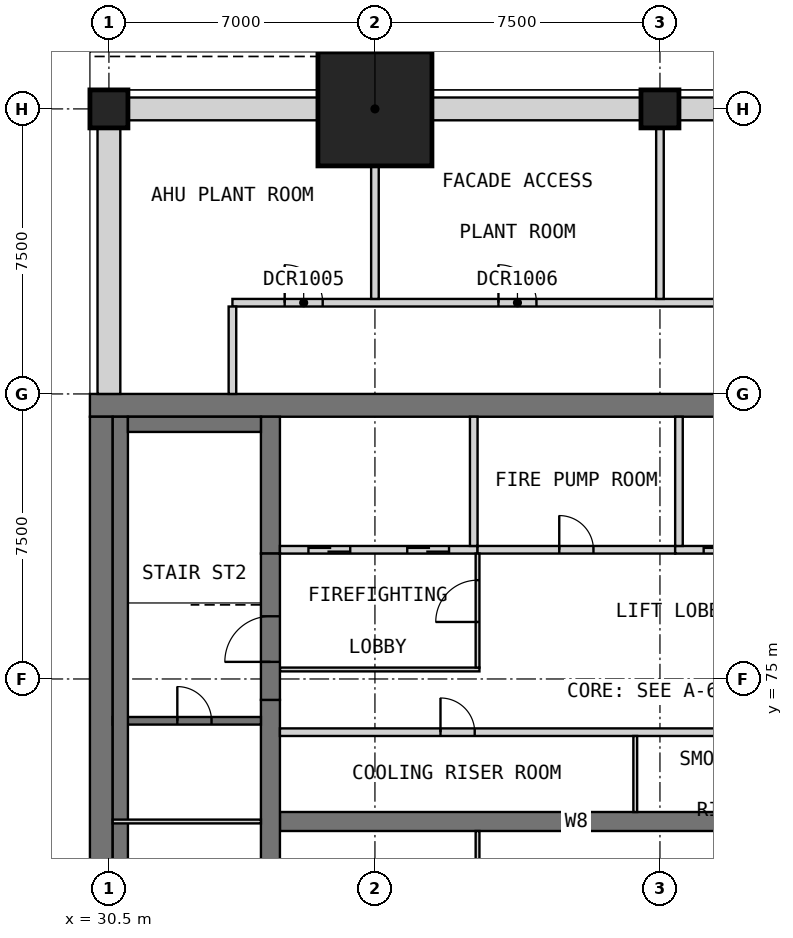
"""IFC4 building model, lengths in metres.
Left out: names, types, materials, properties, quantities, classifications, styles, units other than length and angle.
Written with IfcOpenShell. Run it as: python <this file> out.ifc"""

import sys

from ifc_helpers import new_model, si_unit, direction, frame, frame_2d, origin, origin_2d, place, context, subcontext, project, spatial, rectangle, extrude, element, fill, save


model = new_model("IFC4")
c1 = context("Model", 3, precision=1e-05, world=origin(), true_north=direction((0.0, 1.0)))
c2 = subcontext(c1, "Body", "Model", "MODEL_VIEW")
j1 = project(units=[si_unit("LENGTHUNIT", "METRE"), si_unit("PLANEANGLEUNIT", "RADIAN")], contexts=[c1])
p1 = place(None, origin())
s1 = spatial("IfcSite", under=j1, at=p1, CompositionType="ELEMENT")
p2 = place(p1, origin())
s2 = spatial("IfcBuilding", under=s1, at=p2, CompositionType="ELEMENT")
p3 = place(p2, frame((0.0, 0.0, 320.2)))
s3 = spatial("IfcBuildingStorey", under=s2, at=p3, CompositionType="ELEMENT", Elevation=320.2)
for number, where, z_axis, x_axis in (
    (1, (30.5, 90.0, 0.0), (0.0, 0.0, 1.0), (1.0, 0.0, 0.0)),
    (2, (45.0, 90.0, 0.0), (0.0, 0.0, 1.0), (1.0, 0.0, 0.0)),
):
    element("IfcColumn", number, at=place(p3, frame(where, z_axis=z_axis, x_axis=x_axis)), inside=s3, PredefinedType="COLUMN", context=c2, shape_type="SweptSolid", body=[
        extrude(rectangle(XDim=1.0, YDim=1.0, at=origin_2d()), origin(), (0.0, 0.0, 1.0), 8.0),
    ])
p4 = place(p3, frame((37.5, 90.0, 0.0), z_axis=(0.0, 0.0, 1.0), x_axis=(1.0, 0.0, 0.0)))
e3 = element("IfcColumn", 3, at=p4, inside=s3, PredefinedType="COLUMN", context=c2, shape_type="SweptSolid", body=[
    extrude(rectangle(XDim=3.0, YDim=3.0, at=origin_2d()), origin(), (0.0, 0.0, 1.0), 8.0),
])
p5 = place(p3, frame((30.0, 82.2, 0.0), z_axis=(0.0, 0.0, 1.0), x_axis=(1.0, 0.0, 0.0)))
e4 = element("IfcWall", 4, at=p5, inside=s3, PredefinedType="SHEAR", context=c2, shape_type="SweptSolid", body=[
    extrude(rectangle(XDim=30.0, YDim=0.6, at=frame_2d((15.0, 0.0))), origin(), (0.0, 0.0, 1.0), 7.7),
])
p6 = place(p3, frame((30.3, 60.6, 0.0), z_axis=(0.0, 0.0, 1.0), x_axis=(0.0, 1.0, 0.0)))
e5 = element("IfcWall", 5, at=p6, inside=s3, PredefinedType="SHEAR", context=c2, shape_type="SweptSolid", body=[
    extrude(rectangle(XDim=21.3, YDim=0.6, at=frame_2d((10.65, 0.0))), origin(), (0.0, 0.0, 1.0), 7.7),
])
p7 = place(p3, frame((35.0, 71.25, 0.0), z_axis=(0.0, 0.0, 1.0), x_axis=(1.0, 0.0, 0.0)))
e6 = element("IfcWall", 6, at=p7, inside=s3, PredefinedType="SHEAR", context=c2, shape_type="SweptSolid", body=[
    extrude(rectangle(XDim=15.6, YDim=0.5, at=frame_2d((7.8, 0.0))), origin(), (0.0, 0.0, 1.0), 7.7),
])
p8 = place(p3, frame((34.75, 68.05, 0.0), z_axis=(0.0, 0.0, 1.0), x_axis=(0.0, 1.0, 0.0)))
e7 = element("IfcWall", 7, at=p8, inside=s3, PredefinedType="SHEAR", context=c2, shape_type="SweptSolid", body=[
    extrude(rectangle(XDim=6.4, YDim=0.5, at=frame_2d((3.2, 0.0))), origin(), (0.0, 0.0, 1.0), 7.7),
])
p9 = place(p3, frame((34.75, 78.3, 0.0), z_axis=(0.0, 0.0, 1.0), x_axis=(0.0, 1.0, 0.0)))
e8 = element("IfcWall", 8, at=p9, inside=s3, PredefinedType="SHEAR", context=c2, shape_type="SweptSolid", body=[
    extrude(rectangle(XDim=3.6, YDim=0.5, at=frame_2d((1.8, 0.0))), origin(), (0.0, 0.0, 1.0), 7.7),
])
p10 = place(p3, frame((52.0, 90.0, 0.0), z_axis=(0.0, 0.0, 1.0), x_axis=(-1.0, 0.0, 0.0)))
e9 = element("IfcWall", 9, at=p10, inside=s3, PredefinedType="ELEMENTEDWALL", context=c2, shape_type="SweptSolid", body=[
    extrude(rectangle(XDim=6.5, YDim=0.6, at=frame_2d((3.25, 0.0))), origin(), (0.0, 0.0, 1.0), 6.8),
])
p11 = place(p10, frame((2.75, 0.0, 0.0)))
e10 = element("IfcOpeningElement", 10, at=p11, cuts=e9, PredefinedType="OPENING", context=c2, shape_type="SweptSolid", body=[
    extrude(rectangle(XDim=1.0, YDim=2.1, at=frame_2d((0.5, 1.05))), frame((0.0, 0.31, 0.0), z_axis=(0.0, -1.0, 0.0), x_axis=(1.0, 0.0, 0.0)), (0.0, 0.0, 1.0), 0.62),
])
p12 = place(p3, frame((44.5, 90.0, 0.0), z_axis=(0.0, 0.0, 1.0), x_axis=(-1.0, 0.0, 0.0)))
e11 = element("IfcWall", 11, at=p12, inside=s3, PredefinedType="ELEMENTEDWALL", context=c2, shape_type="SweptSolid", body=[
    extrude(rectangle(XDim=5.5, YDim=0.6, at=frame_2d((2.75, 0.0))), origin(), (0.0, 0.0, 1.0), 6.8),
])
p13 = place(p3, frame((36.0, 90.0, 0.0), z_axis=(0.0, 0.0, 1.0), x_axis=(-1.0, 0.0, 0.0)))
e12 = element("IfcWall", 12, at=p13, inside=s3, PredefinedType="ELEMENTEDWALL", context=c2, shape_type="SweptSolid", body=[
    extrude(rectangle(XDim=5.0, YDim=0.6, at=frame_2d((2.5, 0.0))), origin(), (0.0, 0.0, 1.0), 6.8),
])
p14 = place(p3, frame((30.5, 89.5, 0.0), z_axis=(0.0, 0.0, 1.0), x_axis=(0.0, -1.0, 0.0)))
e13 = element("IfcWall", 13, at=p14, inside=s3, PredefinedType="ELEMENTEDWALL", context=c2, shape_type="SweptSolid", body=[
    extrude(rectangle(XDim=7.0, YDim=0.6, at=frame_2d((3.5, 0.0))), origin(), (0.0, 0.0, 1.0), 6.8),
])
p15 = place(p3, frame((40.2, 68.25, 0.0), z_axis=(0.0, 0.0, 1.0), x_axis=(0.0, 1.0, 0.0)))
e14 = element("IfcWall", 14, at=p15, inside=s3, PredefinedType="PARTITIONING", context=c2, shape_type="SweptSolid", body=[
    extrude(rectangle(XDim=2.75, YDim=0.1, at=frame_2d((1.375, 0.0))), origin(), (0.0, 0.0, 1.0), 7.7),
])
p16 = place(p3, frame((35.0, 73.6, 0.0), z_axis=(0.0, 0.0, 1.0), x_axis=(1.0, 0.0, 0.0)))
e15 = element("IfcWall", 15, at=p16, inside=s3, PredefinedType="PARTITIONING", context=c2, shape_type="SweptSolid", body=[
    extrude(rectangle(XDim=15.6, YDim=0.2, at=frame_2d((7.8, 0.0))), origin(), (0.0, 0.0, 1.0), 7.7),
])
p17 = place(p16, frame((4.225, 0.0, 0.0)))
e16 = element("IfcOpeningElement", 16, at=p17, cuts=e15, PredefinedType="OPENING", context=c2, shape_type="SweptSolid", body=[
    extrude(rectangle(XDim=0.9, YDim=2.1, at=frame_2d((0.45, 1.05))), frame((0.0, 0.11, 0.0), z_axis=(0.0, -1.0, 0.0), x_axis=(1.0, 0.0, 0.0)), (0.0, 0.0, 1.0), 0.22),
])
p18 = place(p16, frame((12.025, 0.0, 0.0)))
e17 = element("IfcOpeningElement", 17, at=p18, cuts=e15, PredefinedType="OPENING", context=c2, shape_type="SweptSolid", body=[
    extrude(rectangle(XDim=0.9, YDim=2.1, at=frame_2d((0.45, 1.05))), frame((0.0, 0.11, 0.0), z_axis=(0.0, -1.0, 0.0), x_axis=(1.0, 0.0, 0.0)), (0.0, 0.0, 1.0), 0.22),
])
p19 = place(p3, frame((44.35, 71.5, 0.0), z_axis=(0.0, 0.0, 1.0), x_axis=(0.0, 1.0, 0.0)))
e18 = element("IfcWall", 18, at=p19, inside=s3, PredefinedType="PARTITIONING", context=c2, shape_type="SweptSolid", body=[
    extrude(rectangle(XDim=2.0, YDim=0.1, at=frame_2d((1.0, 0.0))), origin(), (0.0, 0.0, 1.0), 7.7),
])
p20 = place(p3, frame((35.0, 78.4, 0.0), z_axis=(0.0, 0.0, 1.0), x_axis=(1.0, 0.0, 0.0)))
e19 = element("IfcWall", 19, at=p20, inside=s3, PredefinedType="SOLIDWALL", context=c2, shape_type="SweptSolid", body=[
    extrude(rectangle(XDim=5.2, YDim=0.2, at=frame_2d((2.6, 0.0))), origin(), (0.0, 0.0, 1.0), 8.0),
])
p21 = place(p20, frame((0.75, 0.0, 0.0)))
e20 = element("IfcOpeningElement", 20, at=p21, cuts=e19, PredefinedType="OPENING", context=c2, shape_type="SweptSolid", body=[
    extrude(rectangle(XDim=1.1, YDim=2.1, at=frame_2d((0.55, 1.05))), frame((0.0, 0.11, 0.0), z_axis=(0.0, -1.0, 0.0), x_axis=(1.0, 0.0, 0.0)), (0.0, 0.0, 1.0), 0.22),
])
p22 = place(p20, frame((3.35, 0.0, 0.0)))
e21 = element("IfcOpeningElement", 21, at=p22, cuts=e19, PredefinedType="OPENING", context=c2, shape_type="SweptSolid", body=[
    extrude(rectangle(XDim=1.1, YDim=2.1, at=frame_2d((0.55, 1.05))), frame((0.0, 0.11, 0.0), z_axis=(0.0, -1.0, 0.0), x_axis=(1.0, 0.0, 0.0)), (0.0, 0.0, 1.0), 0.22),
])
p23 = place(p3, frame((40.1, 78.5, 0.0), z_axis=(0.0, 0.0, 1.0), x_axis=(0.0, 1.0, 0.0)))
e22 = element("IfcWall", 22, at=p23, inside=s3, PredefinedType="SOLIDWALL", context=c2, shape_type="SweptSolid", body=[
    extrude(rectangle(XDim=3.4, YDim=0.2, at=frame_2d((1.7, 0.0))), origin(), (0.0, 0.0, 1.0), 8.0),
])
p24 = place(p3, frame((40.2, 78.4, 0.0), z_axis=(0.0, 0.0, 1.0), x_axis=(1.0, 0.0, 0.0)))
e23 = element("IfcWall", 23, at=p24, inside=s3, PredefinedType="PARTITIONING", context=c2, shape_type="SweptSolid", body=[
    extrude(rectangle(XDim=5.2, YDim=0.2, at=frame_2d((2.6, 0.0))), origin(), (0.0, 0.0, 1.0), 7.7),
])
p25 = place(p24, frame((2.15, 0.0, 0.0)))
e24 = element("IfcOpeningElement", 24, at=p25, cuts=e23, PredefinedType="OPENING", context=c2, shape_type="SweptSolid", body=[
    extrude(rectangle(XDim=0.9, YDim=2.1, at=frame_2d((0.45, 1.05))), frame((0.0, 0.11, 0.0), z_axis=(0.0, -1.0, 0.0), x_axis=(1.0, 0.0, 0.0)), (0.0, 0.0, 1.0), 0.22),
])
p26 = place(p3, frame((45.4, 78.4, 0.0), z_axis=(0.0, 0.0, 1.0), x_axis=(1.0, 0.0, 0.0)))
e25 = element("IfcWall", 25, at=p26, inside=s3, PredefinedType="SOLIDWALL", context=c2, shape_type="SweptSolid", body=[
    extrude(rectangle(XDim=5.2, YDim=0.2, at=frame_2d((2.6, 0.0))), origin(), (0.0, 0.0, 1.0), 8.0),
])
p27 = place(p26, frame((0.75, 0.0, 0.0)))
e26 = element("IfcOpeningElement", 26, at=p27, cuts=e25, PredefinedType="OPENING", context=c2, shape_type="SweptSolid", body=[
    extrude(rectangle(XDim=1.1, YDim=2.1, at=frame_2d((0.55, 1.05))), frame((0.0, 0.11, 0.0), z_axis=(0.0, -1.0, 0.0), x_axis=(1.0, 0.0, 0.0)), (0.0, 0.0, 1.0), 0.22),
])
p28 = place(p26, frame((3.35, 0.0, 0.0)))
e27 = element("IfcOpeningElement", 27, at=p28, cuts=e25, PredefinedType="OPENING", context=c2, shape_type="SweptSolid", body=[
    extrude(rectangle(XDim=1.1, YDim=2.1, at=frame_2d((0.55, 1.05))), frame((0.0, 0.11, 0.0), z_axis=(0.0, -1.0, 0.0), x_axis=(1.0, 0.0, 0.0)), (0.0, 0.0, 1.0), 0.22),
])
p29 = place(p3, frame((45.5, 78.5, 0.0), z_axis=(0.0, 0.0, 1.0), x_axis=(0.0, 1.0, 0.0)))
e28 = element("IfcWall", 28, at=p29, inside=s3, PredefinedType="SOLIDWALL", context=c2, shape_type="SweptSolid", body=[
    extrude(rectangle(XDim=3.4, YDim=0.2, at=frame_2d((1.7, 0.0))), origin(), (0.0, 0.0, 1.0), 8.0),
])
p30 = place(p3, frame((35.0, 75.25, 0.0), z_axis=(0.0, 0.0, 1.0), x_axis=(1.0, 0.0, 0.0)))
e29 = element("IfcWall", 29, at=p30, inside=s3, PredefinedType="PARTITIONING", context=c2, shape_type="SweptSolid", body=[
    extrude(rectangle(XDim=5.25, YDim=0.1, at=frame_2d((2.625, 0.0))), origin(), (0.0, 0.0, 1.0), 7.7),
])
p31 = place(p3, frame((40.2, 75.3, 0.0), z_axis=(0.0, 0.0, 1.0), x_axis=(0.0, 1.0, 0.0)))
e30 = element("IfcWall", 30, at=p31, inside=s3, PredefinedType="PARTITIONING", context=c2, shape_type="SweptSolid", body=[
    extrude(rectangle(XDim=3.0, YDim=0.1, at=frame_2d((1.5, 0.0))), origin(), (0.0, 0.0, 1.0), 7.7),
])
p32 = place(p31, frame((1.2, 0.0, 0.0)))
e31 = element("IfcOpeningElement", 31, at=p32, cuts=e30, PredefinedType="OPENING", context=c2, shape_type="SweptSolid", body=[
    extrude(rectangle(XDim=1.1, YDim=2.1, at=frame_2d((0.55, 1.05))), frame((0.0, 0.06, 0.0), z_axis=(0.0, -1.0, 0.0), x_axis=(1.0, 0.0, 0.0)), (0.0, 0.0, 1.0), 0.12),
])
p33 = place(p3, frame((34.75, 74.45, 0.0), z_axis=(0.0, 0.0, 1.0), x_axis=(0.0, 1.0, 0.0)))
e32 = element("IfcWall", 32, at=p33, inside=s3, PredefinedType="SOLIDWALL", context=c2, shape_type="SweptSolid", body=[
    extrude(rectangle(XDim=3.85, YDim=0.5, at=frame_2d((1.925, 0.0))), origin(), (0.0, 0.0, 1.0), 6.5),
])
p34 = place(p33, frame((1.0, 0.0, 0.0)))
e33 = element("IfcOpeningElement", 33, at=p34, cuts=e32, PredefinedType="OPENING", context=c2, shape_type="SweptSolid", body=[
    extrude(rectangle(XDim=1.2, YDim=2.1, at=frame_2d((0.6, 1.05))), frame((0.0, 0.26, 0.0), z_axis=(0.0, -1.0, 0.0), x_axis=(1.0, 0.0, 0.0)), (0.0, 0.0, 1.0), 0.52),
])
p35 = place(p3, frame((30.6, 73.9, 0.0), z_axis=(0.0, 0.0, 1.0), x_axis=(1.0, 0.0, 0.0)))
e34 = element("IfcWall", 34, at=p35, inside=s3, PredefinedType="SOLIDWALL", context=c2, shape_type="SweptSolid", body=[
    extrude(rectangle(XDim=3.9, YDim=0.2, at=frame_2d((1.95, 0.0))), origin(), (0.0, 0.0, 1.0), 7.7),
])
p36 = place(p35, frame((1.7, 0.0, 0.0)))
e35 = element("IfcOpeningElement", 35, at=p36, cuts=e34, PredefinedType="OPENING", context=c2, shape_type="SweptSolid", body=[
    extrude(rectangle(XDim=0.9, YDim=2.1, at=frame_2d((0.45, 1.05))), frame((0.0, 0.11, 0.0), z_axis=(0.0, -1.0, 0.0), x_axis=(1.0, 0.0, 0.0)), (0.0, 0.0, 1.0), 0.22),
])
p37 = place(p3, frame((30.8, 60.6, 0.0), z_axis=(0.0, 0.0, 1.0), x_axis=(0.0, 1.0, 0.0)))
e36 = element("IfcWall", 36, at=p37, inside=s3, PredefinedType="SOLIDWALL", context=c2, shape_type="SweptSolid", body=[
    extrude(rectangle(XDim=21.3, YDim=0.4, at=frame_2d((10.65, 0.0))), origin(), (0.0, 0.0, 1.0), 7.7),
])
p38 = place(p3, frame((31.0, 81.7, 0.0), z_axis=(0.0, 0.0, 1.0), x_axis=(1.0, 0.0, 0.0)))
e37 = element("IfcWall", 37, at=p38, inside=s3, PredefinedType="SOLIDWALL", context=c2, shape_type="SweptSolid", body=[
    extrude(rectangle(XDim=3.5, YDim=0.4, at=frame_2d((1.75, 0.0))), origin(), (0.0, 0.0, 1.0), 7.7),
])
p39 = place(p3, frame((30.6, 71.25, 0.0), z_axis=(0.0, 0.0, 1.0), x_axis=(1.0, 0.0, 0.0)))
e38 = element("IfcWall", 38, at=p39, inside=s3, PredefinedType="PARTITIONING", context=c2, shape_type="SweptSolid", body=[
    extrude(rectangle(XDim=3.9, YDim=0.1, at=frame_2d((1.95, 0.0))), origin(), (0.0, 0.0, 1.0), 7.7),
])
p40 = place(p3, frame((33.75, 84.9, 0.0), z_axis=(0.0, 0.0, 1.0), x_axis=(1.0, 0.0, 0.0)))
e39 = element("IfcWall", 39, at=p40, inside=s3, PredefinedType="PARTITIONING", context=c2, shape_type="SweptSolid", body=[
    extrude(rectangle(XDim=28.65, YDim=0.2, at=frame_2d((14.325, 0.0))), origin(), (0.0, 0.0, 1.0), 7.7),
])
p41 = place(p40, frame((1.375, 0.0, 0.0)))
e40 = element("IfcOpeningElement", 40, at=p41, cuts=e39, PredefinedType="OPENING", context=c2, shape_type="SweptSolid", body=[
    extrude(rectangle(XDim=1.0, YDim=2.1, at=frame_2d((0.5, 1.05))), frame((0.0, 0.11, 0.0), z_axis=(0.0, -1.0, 0.0), x_axis=(1.0, 0.0, 0.0)), (0.0, 0.0, 1.0), 0.22),
])
p42 = place(p40, frame((7.0, 0.0, 0.0)))
e41 = element("IfcOpeningElement", 41, at=p42, cuts=e39, PredefinedType="OPENING", context=c2, shape_type="SweptSolid", body=[
    extrude(rectangle(XDim=1.0, YDim=2.1, at=frame_2d((0.5, 1.05))), frame((0.0, 0.11, 0.0), z_axis=(0.0, -1.0, 0.0), x_axis=(1.0, 0.0, 0.0)), (0.0, 0.0, 1.0), 0.22),
])
p43 = place(p40, frame((18.25, 0.0, 0.0)))
e42 = element("IfcOpeningElement", 42, at=p43, cuts=e39, PredefinedType="OPENING", context=c2, shape_type="SweptSolid", body=[
    extrude(rectangle(XDim=1.0, YDim=2.1, at=frame_2d((0.5, 1.05))), frame((0.0, 0.11, 0.0), z_axis=(0.0, -1.0, 0.0), x_axis=(1.0, 0.0, 0.0)), (0.0, 0.0, 1.0), 0.22),
])
p44 = place(p3, frame((33.75, 82.5, 0.0), z_axis=(0.0, 0.0, 1.0), x_axis=(0.0, 1.0, 0.0)))
e43 = element("IfcWall", 43, at=p44, inside=s3, PredefinedType="PARTITIONING", context=c2, shape_type="SweptSolid", body=[
    extrude(rectangle(XDim=2.3, YDim=0.2, at=frame_2d((1.15, 0.0))), origin(), (0.0, 0.0, 1.0), 7.7),
])
for number, where, z_axis, x_axis in (
    (44, (37.5, 85.0, 0.0), (0.0, 0.0, 1.0), (0.0, 1.0, 0.0)),
    (45, (45.0, 85.0, 0.0), (0.0, 0.0, 1.0), (0.0, 1.0, 0.0)),
):
    element("IfcWall", number, at=place(p3, frame(where, z_axis=z_axis, x_axis=x_axis)), inside=s3, PredefinedType="PARTITIONING", context=c2, shape_type="SweptSolid", body=[
        extrude(rectangle(XDim=5.5, YDim=0.2, at=frame_2d((2.75, 0.0))), origin(), (0.0, 0.0, 1.0), 7.7),
    ])
p45 = place(p17, origin())
e46 = element("IfcDoor", 46, at=p45, inside=s3, OperationType="SINGLE_SWING_RIGHT", PredefinedType="DOOR", context=c2, shape_type="SweptSolid", body=[
    extrude(rectangle(XDim=0.9, YDim=2.1, at=frame_2d((0.45, 1.05))), frame((0.0, 0.025, 0.0), z_axis=(0.0, -1.0, 0.0), x_axis=(1.0, 0.0, 0.0)), (0.0, 0.0, 1.0), 0.05),
])
fill(e16, e46)
p46 = place(p21, origin())
e47 = element("IfcDoor", 47, at=p46, inside=s3, OperationType="DOUBLE_DOOR_SLIDING", PredefinedType="DOOR", context=c2, shape_type="SweptSolid", body=[
    extrude(rectangle(XDim=1.1, YDim=2.1, at=frame_2d((0.55, 1.05))), frame((0.0, 0.025, 0.0), z_axis=(0.0, -1.0, 0.0), x_axis=(1.0, 0.0, 0.0)), (0.0, 0.0, 1.0), 0.05),
])
fill(e20, e47)
p47 = place(p22, origin())
e48 = element("IfcDoor", 48, at=p47, inside=s3, OperationType="DOUBLE_DOOR_SLIDING", PredefinedType="DOOR", context=c2, shape_type="SweptSolid", body=[
    extrude(rectangle(XDim=1.1, YDim=2.1, at=frame_2d((0.55, 1.05))), frame((0.0, 0.025, 0.0), z_axis=(0.0, -1.0, 0.0), x_axis=(1.0, 0.0, 0.0)), (0.0, 0.0, 1.0), 0.05),
])
fill(e21, e48)
p48 = place(p25, origin())
e49 = element("IfcDoor", 49, at=p48, inside=s3, OperationType="SINGLE_SWING_RIGHT", PredefinedType="DOOR", context=c2, shape_type="SweptSolid", body=[
    extrude(rectangle(XDim=0.9, YDim=2.1, at=frame_2d((0.45, 1.05))), frame((0.0, 0.025, 0.0), z_axis=(0.0, -1.0, 0.0), x_axis=(1.0, 0.0, 0.0)), (0.0, 0.0, 1.0), 0.05),
])
fill(e24, e49)
p49 = place(p27, origin())
e50 = element("IfcDoor", 50, at=p49, inside=s3, OperationType="DOUBLE_DOOR_SLIDING", PredefinedType="DOOR", context=c2, shape_type="SweptSolid", body=[
    extrude(rectangle(XDim=1.1, YDim=2.1, at=frame_2d((0.55, 1.05))), frame((0.0, 0.025, 0.0), z_axis=(0.0, -1.0, 0.0), x_axis=(1.0, 0.0, 0.0)), (0.0, 0.0, 1.0), 0.05),
])
fill(e26, e50)
p50 = place(p32, origin())
e51 = element("IfcDoor", 51, at=p50, inside=s3, OperationType="SINGLE_SWING_LEFT", PredefinedType="DOOR", context=c2, shape_type="SweptSolid", body=[
    extrude(rectangle(XDim=1.1, YDim=2.1, at=frame_2d((0.55, 1.05))), frame((0.0, 0.025, 0.0), z_axis=(0.0, -1.0, 0.0), x_axis=(1.0, 0.0, 0.0)), (0.0, 0.0, 1.0), 0.05),
])
fill(e31, e51)
p51 = place(p34, origin())
e52 = element("IfcDoor", 52, at=p51, inside=s3, OperationType="SINGLE_SWING_RIGHT", PredefinedType="DOOR", context=c2, shape_type="SweptSolid", body=[
    extrude(rectangle(XDim=1.2, YDim=2.1, at=frame_2d((0.6, 1.05))), frame((0.0, 0.025, 0.0), z_axis=(0.0, -1.0, 0.0), x_axis=(1.0, 0.0, 0.0)), (0.0, 0.0, 1.0), 0.05),
])
fill(e33, e52)
p52 = place(p36, origin())
e53 = element("IfcDoor", 53, at=p52, inside=s3, OperationType="SINGLE_SWING_RIGHT", PredefinedType="DOOR", context=c2, shape_type="SweptSolid", body=[
    extrude(rectangle(XDim=0.9, YDim=2.1, at=frame_2d((0.45, 1.05))), frame((0.0, 0.025, 0.0), z_axis=(0.0, -1.0, 0.0), x_axis=(1.0, 0.0, 0.0)), (0.0, 0.0, 1.0), 0.05),
])
fill(e35, e53)
p53 = place(p41, origin())
e54 = element("IfcDoor", 54, at=p53, inside=s3, OperationType="SINGLE_SWING_LEFT", PredefinedType="DOOR", context=c2, shape_type="SweptSolid", body=[
    extrude(rectangle(XDim=1.0, YDim=2.1, at=frame_2d((0.5, 1.05))), frame((0.0, 0.025, 0.0), z_axis=(0.0, -1.0, 0.0), x_axis=(1.0, 0.0, 0.0)), (0.0, 0.0, 1.0), 0.05),
])
fill(e40, e54)
p54 = place(p42, origin())
e55 = element("IfcDoor", 55, at=p54, inside=s3, OperationType="SINGLE_SWING_LEFT", PredefinedType="DOOR", context=c2, shape_type="SweptSolid", body=[
    extrude(rectangle(XDim=1.0, YDim=2.1, at=frame_2d((0.5, 1.05))), frame((0.0, 0.025, 0.0), z_axis=(0.0, -1.0, 0.0), x_axis=(1.0, 0.0, 0.0)), (0.0, 0.0, 1.0), 0.05),
])
fill(e41, e55)
save(model, sys.argv[1])
